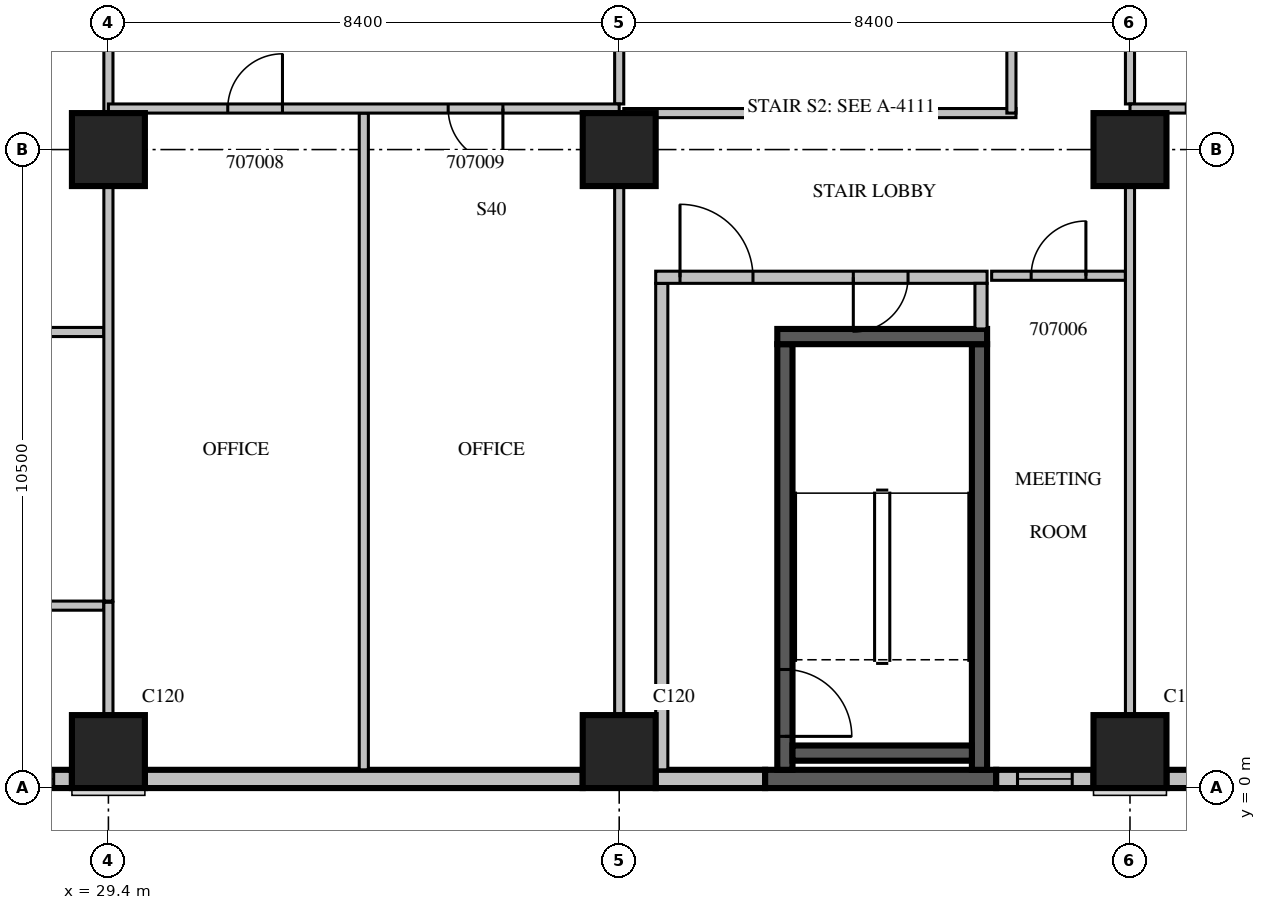
"""IFC4 building model, lengths in metres.
Left out: names, types, materials, properties, quantities, classifications, styles, units other than length and angle.
Written with IfcOpenShell. Run it as: python <this file> out.ifc"""

import sys

from ifc_helpers import new_model, si_unit, direction, frame, frame_2d, origin, origin_2d, place, context, subcontext, project, spatial, rectangle, extrude, source, transform, mapped, element, fill, save


model = new_model("IFC4")
c1 = context("Model", 3, precision=1e-05, world=origin(), true_north=direction((0.0, 1.0)))
c2 = subcontext(c1, "Body", "Model", "MODEL_VIEW")
j1 = project(units=[si_unit("LENGTHUNIT", "METRE"), si_unit("PLANEANGLEUNIT", "RADIAN")], contexts=[c1])
p1 = place(None, origin())
s1 = spatial("IfcSite", under=j1, at=p1, CompositionType="ELEMENT")
p2 = place(p1, origin())
s2 = spatial("IfcBuilding", under=s1, at=p2, CompositionType="ELEMENT")
p3 = place(p2, frame((0.0, 0.0, 40.5)))
s3 = spatial("IfcBuildingStorey", under=s2, at=p3, CompositionType="ELEMENT", Elevation=40.5)
m1 = source(origin(), c2, "Body", "SweptSolid", [
    extrude(rectangle(XDim=1.2, YDim=1.2, at=origin_2d()), origin(), (0.0, 0.0, 1.0), 4.2),
])
for number, where, z_axis, x_axis in (
    (1, (29.4, 0.6, 0.0), (0.0, 0.0, 1.0), (1.0, 0.0, 0.0)),
    (2, (37.8, 0.6, 0.0), (0.0, 0.0, 1.0), (1.0, 0.0, 0.0)),
    (3, (46.2, 0.6, 0.0), (0.0, 0.0, 1.0), (1.0, 0.0, 0.0)),
    (4, (29.4, 10.5, 0.0), (0.0, 0.0, 1.0), (1.0, 0.0, 0.0)),
    (5, (37.8, 10.5, 0.0), (0.0, 0.0, 1.0), (1.0, 0.0, 0.0)),
    (6, (46.2, 10.5, 0.0), (0.0, 0.0, 1.0), (1.0, 0.0, 0.0)),
):
    element("IfcColumn", number, at=place(p3, frame(where, z_axis=z_axis, x_axis=x_axis)), inside=s3, PredefinedType="COLUMN", context=c2, shape_type="MappedRepresentation", body=[
        mapped(m1, transform((0.0, 0.0, 0.0), scale=1.0)),
    ])
p4 = place(p3, frame((21.6, 0.15, 0.0), z_axis=(0.0, 0.0, 1.0), x_axis=(1.0, 0.0, 0.0)))
e7 = element("IfcWall", 7, at=p4, inside=s3, PredefinedType="STANDARD", context=c2, shape_type="SweptSolid", body=[
    extrude(rectangle(XDim=7.2, YDim=0.3, at=frame_2d((3.6, 0.0))), origin(), (0.0, 0.0, 1.0), 3.8),
])
p5 = place(p4, frame((0.3, 0.0, 0.6)))
e8 = element("IfcOpeningElement", 8, at=p5, cuts=e7, PredefinedType="OPENING", context=c2, shape_type="SweptSolid", body=[
    extrude(rectangle(XDim=2.4, YDim=2.7, at=frame_2d((1.2, 1.35))), frame((0.0, 0.16, 0.0), z_axis=(0.0, -1.0, 0.0), x_axis=(1.0, 0.0, 0.0)), (0.0, 0.0, 1.0), 0.32),
])
m2 = source(origin(), c2, "Body", "SweptSolid", [
    extrude(rectangle(XDim=2.4, YDim=2.7, at=frame_2d((1.2, 1.35))), frame((0.0, 0.16, 0.0), z_axis=(0.0, -1.0, 0.0), x_axis=(1.0, 0.0, 0.0)), (0.0, 0.0, 1.0), 0.32),
])
p6 = place(p4, frame((4.5, 0.0, 0.6)))
e9 = element("IfcOpeningElement", 9, at=p6, cuts=e7, PredefinedType="OPENING", context=c2, shape_type="MappedRepresentation", body=[
    mapped(m2, transform((0.0, 0.0, 0.0), scale=1.0)),
])
m3 = source(origin(), c2, "Body", "SweptSolid", [
    extrude(rectangle(XDim=7.2, YDim=0.3, at=frame_2d((3.6, 0.0))), origin(), (0.0, 0.0, 1.0), 3.8),
])
p7 = place(p3, frame((30.0, 0.15, 0.0), z_axis=(0.0, 0.0, 1.0), x_axis=(1.0, 0.0, 0.0)))
e10 = element("IfcWall", 10, at=p7, inside=s3, PredefinedType="STANDARD", context=c2, shape_type="MappedRepresentation", body=[
    mapped(m3, transform((0.0, 0.0, 0.0), scale=1.0)),
])
p8 = place(p3, frame((38.4, 0.15, 0.0), z_axis=(0.0, 0.0, 1.0), x_axis=(1.0, 0.0, 0.0)))
e11 = element("IfcWall", 11, at=p8, inside=s3, PredefinedType="STANDARD", context=c2, shape_type="SweptSolid", body=[
    extrude(rectangle(XDim=1.8, YDim=0.3, at=frame_2d((0.9, 0.0))), origin(), (0.0, 0.0, 1.0), 3.8),
])
p9 = place(p3, frame((40.2, 0.15, 0.0), z_axis=(0.0, 0.0, 1.0), x_axis=(1.0, 0.0, 0.0)))
e12 = element("IfcWall", 12, at=p9, inside=s3, PredefinedType="SOLIDWALL", context=c2, shape_type="SweptSolid", body=[
    extrude(rectangle(XDim=3.8, YDim=0.3, at=frame_2d((1.9, 0.0))), origin(), (0.0, 0.0, 1.0), 3.8),
])
p10 = place(p3, frame((44.0, 0.15, 0.0), z_axis=(0.0, 0.0, 1.0), x_axis=(1.0, 0.0, 0.0)))
e13 = element("IfcWall", 13, at=p10, inside=s3, PredefinedType="STANDARD", context=c2, shape_type="SweptSolid", body=[
    extrude(rectangle(XDim=1.6, YDim=0.3, at=frame_2d((0.8, 0.0))), origin(), (0.0, 0.0, 1.0), 3.8),
])
p11 = place(p10, frame((0.35, 0.0, 0.6)))
e14 = element("IfcOpeningElement", 14, at=p11, cuts=e13, PredefinedType="OPENING", context=c2, shape_type="SweptSolid", body=[
    extrude(rectangle(XDim=0.9, YDim=2.7, at=frame_2d((0.45, 1.35))), frame((0.0, 0.16, 0.0), z_axis=(0.0, -1.0, 0.0), x_axis=(1.0, 0.0, 0.0)), (0.0, 0.0, 1.0), 0.32),
])
p12 = place(p3, frame((46.8, 0.15, 0.0), z_axis=(0.0, 0.0, 1.0), x_axis=(1.0, 0.0, 0.0)))
e15 = element("IfcWall", 15, at=p12, inside=s3, PredefinedType="STANDARD", context=c2, shape_type="SweptSolid", body=[
    extrude(rectangle(XDim=4.68, YDim=0.3, at=frame_2d((2.34, 0.0))), origin(), (0.0, 0.0, 1.0), 3.3),
])
m4 = source(origin(), c2, "Body", "SweptSolid", [
    extrude(rectangle(XDim=3.6, YDim=2.7, at=frame_2d((1.8, 1.35))), frame((0.0, 0.16, 0.0), z_axis=(0.0, -1.0, 0.0), x_axis=(1.0, 0.0, 0.0)), (0.0, 0.0, 1.0), 0.32),
])
p13 = place(p12, frame((0.54, 0.0, 0.6)))
e16 = element("IfcOpeningElement", 16, at=p13, cuts=e15, PredefinedType="OPENING", context=c2, shape_type="MappedRepresentation", body=[
    mapped(m4, transform((0.0, 0.0, 0.0), scale=1.0)),
])
p14 = place(p3, frame((40.525, 0.3, 0.0), z_axis=(0.0, 0.0, 1.0), x_axis=(0.0, 1.0, 0.0)))
e17 = element("IfcWall", 17, at=p14, inside=s3, PredefinedType="SOLIDWALL", context=c2, shape_type="SweptSolid", body=[
    extrude(rectangle(XDim=7.0, YDim=0.25, at=frame_2d((3.5, 0.0))), origin(), (0.0, 0.0, 1.0), 3.8),
])
m5 = source(origin(), c2, "Body", "SweptSolid", [
    extrude(rectangle(XDim=1.1, YDim=2.1, at=frame_2d((0.55, 1.05))), frame((0.0, 0.135, 0.0), z_axis=(0.0, -1.0, 0.0), x_axis=(1.0, 0.0, 0.0)), (0.0, 0.0, 1.0), 0.27),
])
p15 = place(p14, frame((0.55, 0.0, 0.0)))
e18 = element("IfcOpeningElement", 18, at=p15, cuts=e17, PredefinedType="OPENING", context=c2, shape_type="MappedRepresentation", body=[
    mapped(m5, transform((0.0, 0.0, 0.0), scale=1.0)),
])
m6 = source(origin(), c2, "Body", "SweptSolid", [
    extrude(rectangle(XDim=7.0, YDim=0.25, at=frame_2d((3.5, 0.0))), origin(), (0.0, 0.0, 1.0), 3.8),
])
p16 = place(p3, frame((43.725, 0.3, 0.0), z_axis=(0.0, 0.0, 1.0), x_axis=(0.0, 1.0, 0.0)))
e19 = element("IfcWall", 19, at=p16, inside=s3, PredefinedType="SOLIDWALL", context=c2, shape_type="MappedRepresentation", body=[
    mapped(m6, transform((0.0, 0.0, 0.0), scale=1.0)),
])
p17 = place(p3, frame((40.4, 7.425, 0.0), z_axis=(0.0, 0.0, 1.0), x_axis=(1.0, 0.0, 0.0)))
e20 = element("IfcWall", 20, at=p17, inside=s3, PredefinedType="SOLIDWALL", context=c2, shape_type="SweptSolid", body=[
    extrude(rectangle(XDim=3.45, YDim=0.25, at=frame_2d((1.725, 0.0))), origin(), (0.0, 0.0, 1.0), 3.8),
])
p18 = place(p3, frame((40.65, 0.575, 0.0), z_axis=(0.0, 0.0, 1.0), x_axis=(1.0, 0.0, 0.0)))
e21 = element("IfcWall", 21, at=p18, inside=s3, PredefinedType="SOLIDWALL", context=c2, shape_type="SweptSolid", body=[
    extrude(rectangle(XDim=2.95, YDim=0.25, at=frame_2d((1.475, 0.0))), origin(), (0.0, 0.0, 1.0), 3.8),
])
p19 = place(p3, frame((38.5, 0.3, 0.0), z_axis=(0.0, 0.0, 1.0), x_axis=(0.0, 1.0, 0.0)))
e22 = element("IfcWall", 22, at=p19, inside=s3, PredefinedType="PARTITIONING", context=c2, shape_type="SweptSolid", body=[
    extrude(rectangle(XDim=8.0, YDim=0.2, at=frame_2d((4.0, 0.0))), origin(), (0.0, 0.0, 1.0), 3.8),
])
p20 = place(p3, frame((38.4, 8.4, 0.0), z_axis=(0.0, 0.0, 1.0), x_axis=(1.0, 0.0, 0.0)))
e23 = element("IfcWall", 23, at=p20, inside=s3, PredefinedType="PARTITIONING", context=c2, shape_type="SweptSolid", body=[
    extrude(rectangle(XDim=5.45, YDim=0.2, at=frame_2d((2.725, 0.0))), origin(), (0.0, 0.0, 1.0), 3.8),
])
m7 = source(origin(), c2, "Body", "SweptSolid", [
    extrude(rectangle(XDim=1.2, YDim=2.1, at=frame_2d((0.6, 1.05))), frame((0.0, 0.11, 0.0), z_axis=(0.0, -1.0, 0.0), x_axis=(1.0, 0.0, 0.0)), (0.0, 0.0, 1.0), 0.22),
])
p21 = place(p20, frame((0.4, 0.0, 0.0)))
e24 = element("IfcOpeningElement", 24, at=p21, cuts=e23, PredefinedType="OPENING", context=c2, shape_type="MappedRepresentation", body=[
    mapped(m7, transform((0.0, 0.0, 0.0), scale=1.0)),
])
m8 = source(origin(), c2, "Body", "SweptSolid", [
    extrude(rectangle(XDim=0.9, YDim=2.1, at=frame_2d((0.45, 1.05))), frame((0.0, 0.11, 0.0), z_axis=(0.0, -1.0, 0.0), x_axis=(1.0, 0.0, 0.0)), (0.0, 0.0, 1.0), 0.22),
])
p22 = place(p20, frame((3.25, 0.0, 0.0)))
e25 = element("IfcOpeningElement", 25, at=p22, cuts=e23, PredefinedType="OPENING", context=c2, shape_type="MappedRepresentation", body=[
    mapped(m8, transform((0.0, 0.0, 0.0), scale=1.0)),
])
p23 = place(p3, frame((43.75, 7.55, 0.0), z_axis=(0.0, 0.0, 1.0), x_axis=(0.0, 1.0, 0.0)))
e26 = element("IfcWall", 26, at=p23, inside=s3, PredefinedType="PARTITIONING", context=c2, shape_type="SweptSolid", body=[
    extrude(rectangle(XDim=0.75, YDim=0.2, at=frame_2d((0.375, 0.0))), origin(), (0.0, 0.0, 1.0), 3.8),
])
p24 = place(p3, frame((29.325, 7.5, 0.0), z_axis=(0.0, 0.0, 1.0), x_axis=(-1.0, 0.0, 0.0)))
e27 = element("IfcWall", 27, at=p24, inside=s3, PredefinedType="PARTITIONING", context=c2, shape_type="SweptSolid", body=[
    extrude(rectangle(XDim=5.15, YDim=0.15, at=frame_2d((2.575, 0.0))), origin(), (0.0, 0.0, 1.0), 3.8),
])
p25 = place(p3, frame((29.4, 3.075, 0.0), z_axis=(0.0, 0.0, 1.0), x_axis=(0.0, 1.0, 0.0)))
e28 = element("IfcWall", 28, at=p25, inside=s3, PredefinedType="PARTITIONING", context=c2, shape_type="SweptSolid", body=[
    extrude(rectangle(XDim=6.826, YDim=0.15, at=frame_2d((3.413, 0.0))), origin(), (0.0, 0.0, 1.0), 3.8),
])
p26 = place(p3, frame((29.4, 11.099, 0.0), z_axis=(0.0, 0.0, 1.0), x_axis=(0.0, 1.0, 0.0)))
e29 = element("IfcWall", 29, at=p26, inside=s3, PredefinedType="PARTITIONING", context=c2, shape_type="SweptSolid", body=[
    extrude(rectangle(XDim=3.901, YDim=0.15, at=frame_2d((1.95, 0.0))), origin(), (0.0, 0.0, 1.0), 3.8),
])
p27 = place(p3, frame((22.2, 3.0, 0.0), z_axis=(0.0, 0.0, 1.0), x_axis=(1.0, 0.0, 0.0)))
e30 = element("IfcWall", 30, at=p27, inside=s3, PredefinedType="PARTITIONING", context=c2, shape_type="SweptSolid", body=[
    extrude(rectangle(XDim=7.125, YDim=0.15, at=frame_2d((3.562, 0.0))), origin(), (0.0, 0.0, 1.0), 3.8),
])
p28 = place(p27, frame((3.1, 0.0, 0.0)))
e31 = element("IfcOpeningElement", 31, at=p28, cuts=e30, PredefinedType="OPENING", context=c2, shape_type="SweptSolid", body=[
    extrude(rectangle(XDim=1.0, YDim=2.1, at=frame_2d((0.5, 1.05))), frame((0.0, 0.085, 0.0), z_axis=(0.0, -1.0, 0.0), x_axis=(1.0, 0.0, 0.0)), (0.0, 0.0, 1.0), 0.17),
])
m9 = source(origin(), c2, "Body", "SweptSolid", [
    extrude(rectangle(XDim=0.9, YDim=2.1, at=frame_2d((0.45, 1.05))), frame((0.0, 0.085, 0.0), z_axis=(0.0, -1.0, 0.0), x_axis=(1.0, 0.0, 0.0)), (0.0, 0.0, 1.0), 0.17),
])
p29 = place(p27, frame((2.112, 0.0, 0.0)))
e32 = element("IfcOpeningElement", 32, at=p29, cuts=e30, PredefinedType="OPENING", context=c2, shape_type="MappedRepresentation", body=[
    mapped(m9, transform((0.0, 0.0, 0.0), scale=1.0)),
])
p30 = place(p3, frame((37.875, 11.1, 0.0), z_axis=(0.0, 0.0, 1.0), x_axis=(1.0, 0.0, 0.0)))
e33 = element("IfcWall", 33, at=p30, inside=s3, PredefinedType="PARTITIONING", context=c2, shape_type="SweptSolid", body=[
    extrude(rectangle(XDim=6.45, YDim=0.15, at=frame_2d((3.225, 0.0))), origin(), (0.0, 0.0, 1.0), 3.8),
])
p31 = place(p3, frame((44.25, 11.1, 0.0), z_axis=(0.0, 0.0, 1.0), x_axis=(0.0, 1.0, 0.0)))
e34 = element("IfcWall", 34, at=p31, inside=s3, PredefinedType="PARTITIONING", context=c2, shape_type="SweptSolid", body=[
    extrude(rectangle(XDim=3.975, YDim=0.15, at=frame_2d((1.988, 0.0))), origin(), (0.0, 0.0, 1.0), 3.8),
])
p32 = place(p3, frame((46.125, 8.425, 0.0), z_axis=(0.0, 0.0, 1.0), x_axis=(-1.0, 0.0, 0.0)))
e35 = element("IfcWall", 35, at=p32, inside=s3, PredefinedType="PARTITIONING", context=c2, shape_type="SweptSolid", body=[
    extrude(rectangle(XDim=2.2, YDim=0.15, at=frame_2d((1.1, 0.0))), origin(), (0.0, 0.0, 1.0), 3.8),
])
p33 = place(p32, frame((0.65, 0.0, 0.0)))
e36 = element("IfcOpeningElement", 36, at=p33, cuts=e35, PredefinedType="OPENING", context=c2, shape_type="MappedRepresentation", body=[
    mapped(m9, transform((0.0, 0.0, 0.0), scale=1.0)),
])
p34 = place(p3, frame((33.6, 0.3, 0.0), z_axis=(0.0, 0.0, 1.0), x_axis=(0.0, 1.0, 0.0)))
e37 = element("IfcWall", 37, at=p34, inside=s3, PredefinedType="PARTITIONING", context=c2, shape_type="SweptSolid", body=[
    extrude(rectangle(XDim=10.8, YDim=0.15, at=frame_2d((5.4, 0.0))), origin(), (0.0, 0.0, 1.0), 3.8),
])
p35 = place(p3, frame((29.4, 1.199, 0.0), z_axis=(0.0, 0.0, 1.0), x_axis=(0.0, 1.0, 0.0)))
e38 = element("IfcWall", 38, at=p35, inside=s3, PredefinedType="PARTITIONING", context=c2, shape_type="SweptSolid", body=[
    extrude(rectangle(XDim=1.856, YDim=0.15, at=frame_2d((0.928, 0.0))), origin(), (0.0, 0.0, 1.0), 3.8),
])
p36 = place(p3, frame((37.8, 1.199, 0.0), z_axis=(0.0, 0.0, 1.0), x_axis=(0.0, 1.0, 0.0)))
e39 = element("IfcWall", 39, at=p36, inside=s3, PredefinedType="PARTITIONING", context=c2, shape_type="SweptSolid", body=[
    extrude(rectangle(XDim=8.702, YDim=0.15, at=frame_2d((4.351, 0.0))), origin(), (0.0, 0.0, 1.0), 3.8),
])
p37 = place(p3, frame((37.8, 11.25, 0.0), z_axis=(0.0, 0.0, 1.0), x_axis=(0.0, 1.0, 0.0)))
e40 = element("IfcWall", 40, at=p37, inside=s3, PredefinedType="PARTITIONING", context=c2, shape_type="SweptSolid", body=[
    extrude(rectangle(XDim=3.75, YDim=0.15, at=frame_2d((1.875, 0.0))), origin(), (0.0, 0.0, 1.0), 3.8),
])
p38 = place(p3, frame((37.8, 11.175, 0.0), z_axis=(0.0, 0.0, 1.0), x_axis=(-1.0, 0.0, 0.0)))
e41 = element("IfcWall", 41, at=p38, inside=s3, PredefinedType="PARTITIONING", context=c2, shape_type="SweptSolid", body=[
    extrude(rectangle(XDim=8.4, YDim=0.15, at=frame_2d((4.2, 0.0))), origin(), (0.0, 0.0, 1.0), 3.8),
])
p39 = place(p38, frame((5.537, 0.0, 0.0)))
e42 = element("IfcOpeningElement", 42, at=p39, cuts=e41, PredefinedType="OPENING", context=c2, shape_type="MappedRepresentation", body=[
    mapped(m9, transform((0.0, 0.0, 0.0), scale=1.0)),
])
p40 = place(p38, frame((1.913, 0.0, 0.0)))
e43 = element("IfcOpeningElement", 43, at=p40, cuts=e41, PredefinedType="OPENING", context=c2, shape_type="MappedRepresentation", body=[
    mapped(m9, transform((0.0, 0.0, 0.0), scale=1.0)),
])
m10 = source(origin(), c2, "Body", "SweptSolid", [
    extrude(rectangle(XDim=8.702, YDim=0.15, at=frame_2d((4.351, 0.0))), origin(), (0.0, 0.0, 1.0), 3.8),
])
p41 = place(p3, frame((46.2, 1.199, 0.0), z_axis=(0.0, 0.0, 1.0), x_axis=(0.0, 1.0, 0.0)))
e44 = element("IfcWall", 44, at=p41, inside=s3, PredefinedType="PARTITIONING", context=c2, shape_type="MappedRepresentation", body=[
    mapped(m10, transform((0.0, 0.0, 0.0), scale=1.0)),
])
m11 = source(origin(), c2, "Body", "SweptSolid", [
    extrude(rectangle(XDim=3.75, YDim=0.15, at=frame_2d((1.875, 0.0))), origin(), (0.0, 0.0, 1.0), 3.8),
])
p42 = place(p3, frame((46.2, 11.25, 0.0), z_axis=(0.0, 0.0, 1.0), x_axis=(0.0, 1.0, 0.0)))
e45 = element("IfcWall", 45, at=p42, inside=s3, PredefinedType="PARTITIONING", context=c2, shape_type="MappedRepresentation", body=[
    mapped(m11, transform((0.0, 0.0, 0.0), scale=1.0)),
])
p43 = place(p3, frame((71.1, 11.175, 0.0), z_axis=(0.0, 0.0, 1.0), x_axis=(-1.0, 0.0, 0.0)))
e46 = element("IfcWall", 46, at=p43, inside=s3, PredefinedType="PARTITIONING", context=c2, shape_type="SweptSolid", body=[
    extrude(rectangle(XDim=24.9, YDim=0.15, at=frame_2d((12.45, 0.0))), origin(), (0.0, 0.0, 1.0), 3.8),
])
m12 = source(origin(), c2, "Body", "SweptSolid", [
    extrude(rectangle(XDim=1.1, YDim=2.1, at=frame_2d((0.55, 1.05))), frame((0.0, 0.085, 0.0), z_axis=(0.0, -1.0, 0.0), x_axis=(1.0, 0.0, 0.0)), (0.0, 0.0, 1.0), 0.17),
])
p44 = place(p43, frame((22.875, 0.0, 0.0)))
e47 = element("IfcOpeningElement", 47, at=p44, cuts=e46, PredefinedType="OPENING", context=c2, shape_type="MappedRepresentation", body=[
    mapped(m12, transform((0.0, 0.0, 0.0), scale=1.0)),
])
p45 = place(p43, frame((15.633, 0.0, 0.0)))
e48 = element("IfcOpeningElement", 48, at=p45, cuts=e46, PredefinedType="OPENING", context=c2, shape_type="MappedRepresentation", body=[
    mapped(m9, transform((0.0, 0.0, 0.0), scale=1.0)),
])
p46 = place(p43, frame((9.752, 0.0, 0.0)))
e49 = element("IfcOpeningElement", 49, at=p46, cuts=e46, PredefinedType="OPENING", context=c2, shape_type="MappedRepresentation", body=[
    mapped(m9, transform((0.0, 0.0, 0.0), scale=1.0)),
])
p47 = place(p43, frame((4.607, 0.0, 0.0)))
e50 = element("IfcOpeningElement", 50, at=p47, cuts=e46, PredefinedType="OPENING", context=c2, shape_type="MappedRepresentation", body=[
    mapped(m9, transform((0.0, 0.0, 0.0), scale=1.0)),
])
p48 = place(p43, frame((2.243, 0.0, 0.0)))
e51 = element("IfcOpeningElement", 51, at=p48, cuts=e46, PredefinedType="OPENING", context=c2, shape_type="MappedRepresentation", body=[
    mapped(m9, transform((0.0, 0.0, 0.0), scale=1.0)),
])
m13 = source(origin(), c2, "Body", "SweptSolid", [
    extrude(rectangle(XDim=2.4, YDim=2.7, at=frame_2d((1.2, 1.35))), frame((0.0, 0.03, 0.0), z_axis=(0.0, -1.0, 0.0), x_axis=(1.0, 0.0, 0.0)), (0.0, 0.0, 1.0), 0.06),
])
p49 = place(p6, origin())
e52 = element("IfcWindow", 52, at=p49, inside=s3, PartitioningType="SINGLE_PANEL", PredefinedType="WINDOW", context=c2, shape_type="MappedRepresentation", body=[
    mapped(m13, transform((0.0, 0.0, 0.0), scale=1.0)),
])
fill(e9, e52)
p50 = place(p11, origin())
e53 = element("IfcWindow", 53, at=p50, inside=s3, PartitioningType="SINGLE_PANEL", PredefinedType="WINDOW", context=c2, shape_type="SweptSolid", body=[
    extrude(rectangle(XDim=0.9, YDim=2.7, at=frame_2d((0.45, 1.35))), frame((0.0, 0.03, 0.0), z_axis=(0.0, -1.0, 0.0), x_axis=(1.0, 0.0, 0.0)), (0.0, 0.0, 1.0), 0.06),
])
fill(e14, e53)
m14 = source(origin(), c2, "Body", "SweptSolid", [
    extrude(rectangle(XDim=1.1, YDim=2.1, at=frame_2d((0.55, 1.05))), frame((0.0, 0.025, 0.0), z_axis=(0.0, -1.0, 0.0), x_axis=(1.0, 0.0, 0.0)), (0.0, 0.0, 1.0), 0.05),
])
p51 = place(p15, origin())
e54 = element("IfcDoor", 54, at=p51, inside=s3, OperationType="SINGLE_SWING_RIGHT", PredefinedType="DOOR", context=c2, shape_type="MappedRepresentation", body=[
    mapped(m14, transform((0.0, 0.0, 0.0), scale=1.0)),
])
fill(e18, e54)
m15 = source(origin(), c2, "Body", "SweptSolid", [
    extrude(rectangle(XDim=1.2, YDim=2.1, at=frame_2d((0.6, 1.05))), frame((0.0, 0.025, 0.0), z_axis=(0.0, -1.0, 0.0), x_axis=(1.0, 0.0, 0.0)), (0.0, 0.0, 1.0), 0.05),
])
p52 = place(p21, origin())
e55 = element("IfcDoor", 55, at=p52, inside=s3, OperationType="SINGLE_SWING_LEFT", PredefinedType="DOOR", context=c2, shape_type="MappedRepresentation", body=[
    mapped(m15, transform((0.0, 0.0, 0.0), scale=1.0)),
])
fill(e24, e55)
m16 = source(origin(), c2, "Body", "SweptSolid", [
    extrude(rectangle(XDim=0.9, YDim=2.1, at=frame_2d((0.45, 1.05))), frame((0.0, 0.025, 0.0), z_axis=(0.0, -1.0, 0.0), x_axis=(1.0, 0.0, 0.0)), (0.0, 0.0, 1.0), 0.05),
])
p53 = place(p22, origin())
e56 = element("IfcDoor", 56, at=p53, inside=s3, OperationType="SINGLE_SWING_RIGHT", PredefinedType="DOOR", context=c2, shape_type="MappedRepresentation", body=[
    mapped(m16, transform((0.0, 0.0, 0.0), scale=1.0)),
])
fill(e25, e56)
p54 = place(p33, origin())
e57 = element("IfcDoor", 57, at=p54, inside=s3, OperationType="SINGLE_SWING_RIGHT", PredefinedType="DOOR", context=c2, shape_type="MappedRepresentation", body=[
    mapped(m16, transform((0.0, 0.0, 0.0), scale=1.0)),
])
fill(e36, e57)
p55 = place(p39, origin())
e58 = element("IfcDoor", 58, at=p55, inside=s3, OperationType="SINGLE_SWING_RIGHT", PredefinedType="DOOR", context=c2, shape_type="MappedRepresentation", body=[
    mapped(m16, transform((0.0, 0.0, 0.0), scale=1.0)),
])
fill(e42, e58)
p56 = place(p40, origin())
e59 = element("IfcDoor", 59, at=p56, inside=s3, OperationType="SINGLE_SWING_LEFT", PredefinedType="DOOR", context=c2, shape_type="MappedRepresentation", body=[
    mapped(m16, transform((0.0, 0.0, 0.0), scale=1.0)),
])
fill(e43, e59)
p57 = place(p44, origin())
e60 = element("IfcDoor", 60, at=p57, inside=s3, OperationType="SINGLE_SWING_RIGHT", PredefinedType="DOOR", context=c2, shape_type="MappedRepresentation", body=[
    mapped(m14, transform((0.0, 0.0, 0.0), scale=1.0)),
])
fill(e47, e60)
save(model, sys.argv[1])
